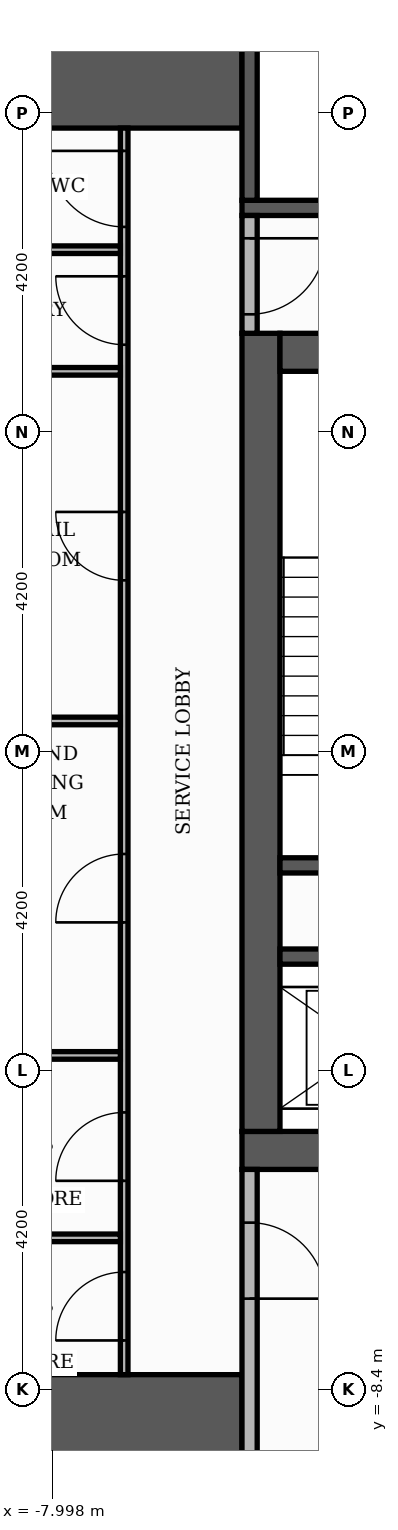
"""IFC4 building model, lengths in metres.
Left out: names, types, materials, properties, quantities, classifications, styles, units other than length and angle.
Written with IfcOpenShell. Run it as: python <this file> out.ifc"""

import sys

from ifc_helpers import new_model, si_unit, direction, frame, frame_2d, origin, place, context, subcontext, project, spatial, rectangle, extrude, element, fill, save


model = new_model("IFC4")
c1 = context("Model", 3, precision=1e-05, world=origin(), true_north=direction((0.0, 1.0)))
c2 = subcontext(c1, "Body", "Model", "MODEL_VIEW")
j1 = project(units=[si_unit("LENGTHUNIT", "METRE"), si_unit("PLANEANGLEUNIT", "RADIAN")], contexts=[c1])
p1 = place(None, origin())
s1 = spatial("IfcSite", under=j1, at=p1, CompositionType="ELEMENT")
p2 = place(p1, origin())
s2 = spatial("IfcBuilding", under=s1, at=p2, CompositionType="ELEMENT")
p3 = place(p2, frame((0.0, 0.0, 279.6)))
s3 = spatial("IfcBuildingStorey", under=s2, at=p3, CompositionType="ELEMENT", Elevation=279.6)
p4 = place(p3, frame((-5.5, -5.25, 0.0), z_axis=(0.0, 0.0, 1.0), x_axis=(1.0, 0.0, 0.0)))
e1 = element("IfcWall", 1, at=p4, inside=s3, PredefinedType="SHEAR", context=c2, shape_type="SweptSolid", body=[
    extrude(rectangle(XDim=11.0, YDim=0.5, at=frame_2d((5.5, 0.0))), origin(), (0.0, 0.0, 1.0), 3.48),
])
p5 = place(p4, frame((4.9, 0.0, 0.0)))
e2 = element("IfcOpeningElement", 2, at=p5, cuts=e1, PredefinedType="OPENING", context=c2, shape_type="SweptSolid", body=[
    extrude(rectangle(XDim=1.2, YDim=2.1, at=frame_2d((0.6, 1.05))), frame((0.0, 0.26, 0.0), z_axis=(0.0, -1.0, 0.0), x_axis=(1.0, 0.0, 0.0)), (0.0, 0.0, 1.0), 0.52),
])
p6 = place(p3, frame((-5.25, -5.0, 0.0), z_axis=(0.0, 0.0, 1.0), x_axis=(0.0, 1.0, 0.0)))
e3 = element("IfcWall", 3, at=p6, inside=s3, PredefinedType="SHEAR", context=c2, shape_type="SweptSolid", body=[
    extrude(rectangle(XDim=10.5, YDim=0.5, at=frame_2d((5.25, 0.0))), origin(), (0.0, 0.0, 1.0), 3.48),
])
p7 = place(p3, frame((-5.0, 5.25, 0.0), z_axis=(0.0, 0.0, 1.0), x_axis=(1.0, 0.0, 0.0)))
e4 = element("IfcWall", 4, at=p7, inside=s3, PredefinedType="SHEAR", context=c2, shape_type="SweptSolid", body=[
    extrude(rectangle(XDim=10.0, YDim=0.5, at=frame_2d((5.0, 0.0))), origin(), (0.0, 0.0, 1.0), 3.48),
])
p8 = place(p7, frame((4.4, 0.0, 0.0)))
e5 = element("IfcOpeningElement", 5, at=p8, cuts=e4, PredefinedType="OPENING", context=c2, shape_type="SweptSolid", body=[
    extrude(rectangle(XDim=1.2, YDim=2.1, at=frame_2d((0.6, 1.05))), frame((0.0, 0.26, 0.0), z_axis=(0.0, -1.0, 0.0), x_axis=(1.0, 0.0, 0.0)), (0.0, 0.0, 1.0), 0.52),
])
for number, where, z_axis, x_axis in (
    (6, (-10.1, -9.15, 0.0), (0.0, 0.0, 1.0), (1.0, 0.0, 0.0)),
    (7, (-10.1, 9.15, 0.0), (0.0, 0.0, 1.0), (1.0, 0.0, 0.0)),
):
    element("IfcWall", number, at=place(p3, frame(where, z_axis=z_axis, x_axis=x_axis)), inside=s3, PredefinedType="SHEAR", context=c2, shape_type="SweptSolid", body=[
        extrude(rectangle(XDim=4.6, YDim=1.9, at=frame_2d((2.3, 0.0))), origin(), (0.0, 0.0, 1.0), 3.48),
    ])
p9 = place(p3, frame((-5.0, -1.5, 0.0), z_axis=(0.0, 0.0, 1.0), x_axis=(1.0, 0.0, 0.0)))
e8 = element("IfcWall", 8, at=p9, inside=s3, PredefinedType="SHEAR", context=c2, shape_type="SweptSolid", body=[
    extrude(rectangle(XDim=3.05, YDim=0.2, at=frame_2d((1.525, 0.0))), origin(), (0.0, 0.0, 1.0), 3.48),
])
p10 = place(p3, frame((-5.5, 7.15, 0.0), z_axis=(0.0, 0.0, 1.0), x_axis=(1.0, 0.0, 0.0)))
e9 = element("IfcWall", 9, at=p10, inside=s3, PredefinedType="SHEAR", context=c2, shape_type="SweptSolid", body=[
    extrude(rectangle(XDim=6.8, YDim=0.2, at=frame_2d((3.4, 0.0))), origin(), (0.0, 0.0, 1.0), 3.48),
])
for number, where, z_axis, x_axis in (
    (10, (-5.4, 7.25, 0.0), (0.0, 0.0, 1.0), (0.0, 1.0, 0.0)),
    (11, (-5.0, -2.7, 0.0), (0.0, 0.0, 1.0), (1.0, 0.0, 0.0)),
):
    element("IfcWall", number, at=place(p3, frame(where, z_axis=z_axis, x_axis=x_axis)), inside=s3, PredefinedType="SHEAR", context=c2, shape_type="SweptSolid", body=[
        extrude(rectangle(XDim=2.85, YDim=0.2, at=frame_2d((1.425, 0.0))), origin(), (0.0, 0.0, 1.0), 3.48),
    ])
p11 = place(p3, frame((-5.4, -10.1, 0.0), z_axis=(0.0, 0.0, 1.0), x_axis=(0.0, 1.0, 0.0)))
e12 = element("IfcWall", 12, at=p11, inside=s3, PredefinedType="PARTITIONING", context=c2, shape_type="SweptSolid", body=[
    extrude(rectangle(XDim=4.6, YDim=0.2, at=frame_2d((2.3, 0.0))), origin(), (0.0, 0.0, 1.0), 3.48),
])
p12 = place(p11, frame((2.9, 0.0, 0.0)))
e13 = element("IfcOpeningElement", 13, at=p12, cuts=e12, PredefinedType="OPENING", context=c2, shape_type="SweptSolid", body=[
    extrude(rectangle(XDim=1.0, YDim=2.1, at=frame_2d((0.5, 1.05))), frame((0.0, 0.11, 0.0), z_axis=(0.0, -1.0, 0.0), x_axis=(1.0, 0.0, 0.0)), (0.0, 0.0, 1.0), 0.22),
])
p13 = place(p3, frame((-7.05, -8.2, 0.0), z_axis=(0.0, 0.0, 1.0), x_axis=(0.0, 1.0, 0.0)))
e14 = element("IfcWall", 14, at=p13, inside=s3, PredefinedType="PARTITIONING", context=c2, shape_type="SweptSolid", body=[
    extrude(rectangle(XDim=16.4, YDim=0.1, at=frame_2d((8.2, 0.0))), origin(), (0.0, 0.0, 1.0), 3.48),
])
p14 = place(p13, frame((0.45, 0.0, 0.0)))
e15 = element("IfcOpeningElement", 15, at=p14, cuts=e14, PredefinedType="OPENING", context=c2, shape_type="SweptSolid", body=[
    extrude(rectangle(XDim=0.9, YDim=2.1, at=frame_2d((0.45, 1.05))), frame((0.0, 0.06, 0.0), z_axis=(0.0, -1.0, 0.0), x_axis=(1.0, 0.0, 0.0)), (0.0, 0.0, 1.0), 0.12),
])
p15 = place(p13, frame((2.55, 0.0, 0.0)))
e16 = element("IfcOpeningElement", 16, at=p15, cuts=e14, PredefinedType="OPENING", context=c2, shape_type="SweptSolid", body=[
    extrude(rectangle(XDim=0.9, YDim=2.1, at=frame_2d((0.45, 1.05))), frame((0.0, 0.06, 0.0), z_axis=(0.0, -1.0, 0.0), x_axis=(1.0, 0.0, 0.0)), (0.0, 0.0, 1.0), 0.12),
])
p16 = place(p13, frame((5.95, 0.0, 0.0)))
e17 = element("IfcOpeningElement", 17, at=p16, cuts=e14, PredefinedType="OPENING", context=c2, shape_type="SweptSolid", body=[
    extrude(rectangle(XDim=0.9, YDim=2.1, at=frame_2d((0.45, 1.05))), frame((0.0, 0.06, 0.0), z_axis=(0.0, -1.0, 0.0), x_axis=(1.0, 0.0, 0.0)), (0.0, 0.0, 1.0), 0.12),
])
p17 = place(p13, frame((10.45, 0.0, 0.0)))
e18 = element("IfcOpeningElement", 18, at=p17, cuts=e14, PredefinedType="OPENING", context=c2, shape_type="SweptSolid", body=[
    extrude(rectangle(XDim=0.9, YDim=2.1, at=frame_2d((0.45, 1.05))), frame((0.0, 0.06, 0.0), z_axis=(0.0, -1.0, 0.0), x_axis=(1.0, 0.0, 0.0)), (0.0, 0.0, 1.0), 0.12),
])
p18 = place(p13, frame((13.55, 0.0, 0.0)))
e19 = element("IfcOpeningElement", 19, at=p18, cuts=e14, PredefinedType="OPENING", context=c2, shape_type="SweptSolid", body=[
    extrude(rectangle(XDim=0.9, YDim=2.1, at=frame_2d((0.45, 1.05))), frame((0.0, 0.06, 0.0), z_axis=(0.0, -1.0, 0.0), x_axis=(1.0, 0.0, 0.0)), (0.0, 0.0, 1.0), 0.12),
])
p19 = place(p13, frame((15.1, 0.0, 0.0)))
e20 = element("IfcOpeningElement", 20, at=p19, cuts=e14, PredefinedType="OPENING", context=c2, shape_type="SweptSolid", body=[
    extrude(rectangle(XDim=1.0, YDim=2.1, at=frame_2d((0.5, 1.05))), frame((0.0, 0.06, 0.0), z_axis=(0.0, -1.0, 0.0), x_axis=(1.0, 0.0, 0.0)), (0.0, 0.0, 1.0), 0.12),
])
for number, where, z_axis, x_axis in (
    (21, (-9.0, -6.4, 0.0), (0.0, 0.0, 1.0), (1.0, 0.0, 0.0)),
    (22, (-9.0, -4.0, 0.0), (0.0, 0.0, 1.0), (1.0, 0.0, 0.0)),
    (23, (-9.0, 0.4, 0.0), (0.0, 0.0, 1.0), (1.0, 0.0, 0.0)),
    (24, (-9.0, 5.0, 0.0), (0.0, 0.0, 1.0), (1.0, 0.0, 0.0)),
):
    element("IfcWall", number, at=place(p3, frame(where, z_axis=z_axis, x_axis=x_axis)), inside=s3, PredefinedType="PARTITIONING", context=c2, shape_type="SweptSolid", body=[
        extrude(rectangle(XDim=1.9, YDim=0.1, at=frame_2d((0.95, 0.0))), origin(), (0.0, 0.0, 1.0), 3.48),
    ])
p20 = place(p3, frame((-5.4, 5.5, 0.0), z_axis=(0.0, 0.0, 1.0), x_axis=(0.0, 1.0, 0.0)))
e25 = element("IfcWall", 25, at=p20, inside=s3, PredefinedType="PARTITIONING", context=c2, shape_type="SweptSolid", body=[
    extrude(rectangle(XDim=1.55, YDim=0.2, at=frame_2d((0.775, 0.0))), origin(), (0.0, 0.0, 1.0), 3.48),
])
p21 = place(p20, frame((0.25, 0.0, 0.0)))
e26 = element("IfcOpeningElement", 26, at=p21, cuts=e25, PredefinedType="OPENING", context=c2, shape_type="SweptSolid", body=[
    extrude(rectangle(XDim=1.0, YDim=2.1, at=frame_2d((0.5, 1.05))), frame((0.0, 0.11, 0.0), z_axis=(0.0, -1.0, 0.0), x_axis=(1.0, 0.0, 0.0)), (0.0, 0.0, 1.0), 0.22),
])
p22 = place(p3, frame((-9.0, 6.6, 0.0), z_axis=(0.0, 0.0, 1.0), x_axis=(1.0, 0.0, 0.0)))
e27 = element("IfcWall", 27, at=p22, inside=s3, PredefinedType="PARTITIONING", context=c2, shape_type="SweptSolid", body=[
    extrude(rectangle(XDim=1.9, YDim=0.1, at=frame_2d((0.95, 0.0))), origin(), (0.0, 0.0, 1.0), 3.48),
])
p23 = place(p21, frame((1.0, 0.0, 0.0), z_axis=(0.0, 0.0, 1.0), x_axis=(-1.0, 0.0, 0.0)))
e28 = element("IfcDoor", 28, at=p23, inside=s3, OperationType="SINGLE_SWING_RIGHT", PredefinedType="DOOR", context=c2, shape_type="SweptSolid", body=[
    extrude(rectangle(XDim=1.0, YDim=2.1, at=frame_2d((0.5, 1.05))), frame((0.0, 0.025, 0.0), z_axis=(0.0, -1.0, 0.0), x_axis=(1.0, 0.0, 0.0)), (0.0, 0.0, 1.0), 0.05),
])
fill(e26, e28)
p24 = place(p12, frame((1.0, 0.0, 0.0), z_axis=(0.0, 0.0, 1.0), x_axis=(-1.0, 0.0, 0.0)))
e29 = element("IfcDoor", 29, at=p24, inside=s3, OperationType="SINGLE_SWING_LEFT", PredefinedType="DOOR", context=c2, shape_type="SweptSolid", body=[
    extrude(rectangle(XDim=1.0, YDim=2.1, at=frame_2d((0.5, 1.05))), frame((0.0, 0.025, 0.0), z_axis=(0.0, -1.0, 0.0), x_axis=(1.0, 0.0, 0.0)), (0.0, 0.0, 1.0), 0.05),
])
fill(e13, e29)
p25 = place(p14, origin())
e30 = element("IfcDoor", 30, at=p25, inside=s3, OperationType="SINGLE_SWING_LEFT", PredefinedType="DOOR", context=c2, shape_type="SweptSolid", body=[
    extrude(rectangle(XDim=0.9, YDim=2.1, at=frame_2d((0.45, 1.05))), frame((0.0, 0.025, 0.0), z_axis=(0.0, -1.0, 0.0), x_axis=(1.0, 0.0, 0.0)), (0.0, 0.0, 1.0), 0.05),
])
fill(e15, e30)
p26 = place(p15, origin())
e31 = element("IfcDoor", 31, at=p26, inside=s3, OperationType="SINGLE_SWING_LEFT", PredefinedType="DOOR", context=c2, shape_type="SweptSolid", body=[
    extrude(rectangle(XDim=0.9, YDim=2.1, at=frame_2d((0.45, 1.05))), frame((0.0, 0.025, 0.0), z_axis=(0.0, -1.0, 0.0), x_axis=(1.0, 0.0, 0.0)), (0.0, 0.0, 1.0), 0.05),
])
fill(e16, e31)
p27 = place(p16, origin())
e32 = element("IfcDoor", 32, at=p27, inside=s3, OperationType="SINGLE_SWING_LEFT", PredefinedType="DOOR", context=c2, shape_type="SweptSolid", body=[
    extrude(rectangle(XDim=0.9, YDim=2.1, at=frame_2d((0.45, 1.05))), frame((0.0, 0.025, 0.0), z_axis=(0.0, -1.0, 0.0), x_axis=(1.0, 0.0, 0.0)), (0.0, 0.0, 1.0), 0.05),
])
fill(e17, e32)
p28 = place(p17, origin())
e33 = element("IfcDoor", 33, at=p28, inside=s3, OperationType="SINGLE_SWING_RIGHT", PredefinedType="DOOR", context=c2, shape_type="SweptSolid", body=[
    extrude(rectangle(XDim=0.9, YDim=2.1, at=frame_2d((0.45, 1.05))), frame((0.0, 0.025, 0.0), z_axis=(0.0, -1.0, 0.0), x_axis=(1.0, 0.0, 0.0)), (0.0, 0.0, 1.0), 0.05),
])
fill(e18, e33)
p29 = place(p18, origin())
e34 = element("IfcDoor", 34, at=p29, inside=s3, OperationType="SINGLE_SWING_RIGHT", PredefinedType="DOOR", context=c2, shape_type="SweptSolid", body=[
    extrude(rectangle(XDim=0.9, YDim=2.1, at=frame_2d((0.45, 1.05))), frame((0.0, 0.025, 0.0), z_axis=(0.0, -1.0, 0.0), x_axis=(1.0, 0.0, 0.0)), (0.0, 0.0, 1.0), 0.05),
])
fill(e19, e34)
p30 = place(p19, origin())
e35 = element("IfcDoor", 35, at=p30, inside=s3, OperationType="SINGLE_SWING_RIGHT", PredefinedType="DOOR", context=c2, shape_type="SweptSolid", body=[
    extrude(rectangle(XDim=1.0, YDim=2.1, at=frame_2d((0.5, 1.05))), frame((0.0, 0.025, 0.0), z_axis=(0.0, -1.0, 0.0), x_axis=(1.0, 0.0, 0.0)), (0.0, 0.0, 1.0), 0.05),
])
fill(e20, e35)
save(model, sys.argv[1])
